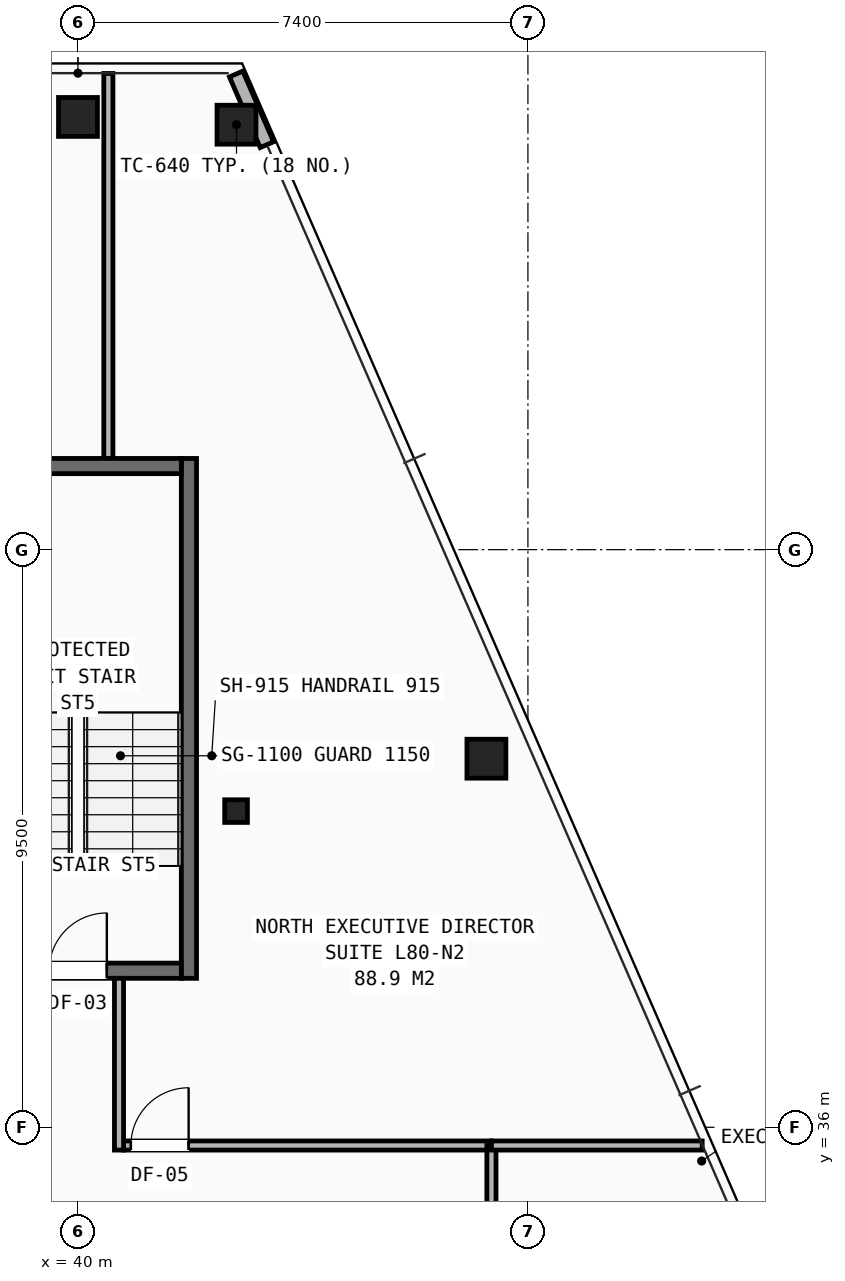
"""IFC4 building model, lengths in metres.
Left out: names, types, materials, properties, quantities, classifications, styles, units other than length and angle.
Written with IfcOpenShell. Run it as: python <this file> out.ifc"""

import sys

from ifc_helpers import new_model, si_unit, direction, frame, frame_2d, origin, origin_2d, place, context, subcontext, project, spatial, rectangle, hollow_rectangle, i_section, extrude, element, fill, save


model = new_model("IFC4")
c1 = context("Model", 3, precision=1e-05, world=origin(), true_north=direction((0.0, 1.0)))
c2 = subcontext(c1, "Body", "Model", "MODEL_VIEW")
j1 = project(units=[si_unit("LENGTHUNIT", "METRE"), si_unit("PLANEANGLEUNIT", "RADIAN")], contexts=[c1])
p1 = place(None, origin())
s1 = spatial("IfcSite", under=j1, at=p1, CompositionType="ELEMENT")
p2 = place(p1, origin())
s2 = spatial("IfcBuilding", under=s1, at=p2, CompositionType="ELEMENT")
p3 = place(p2, frame((0.0, 0.0, 283.0)))
s3 = spatial("IfcBuildingStorey", under=s2, at=p3, CompositionType="ELEMENT", Elevation=283.0)
p4 = place(p3, frame((42.6, 41.2, 0.0), z_axis=(0.0, 0.0, 1.0), x_axis=(1.0, 0.0, 0.0)))
e1 = element("IfcColumn", 1, at=p4, inside=s3, PredefinedType="COLUMN", context=c2, shape_type="SweptSolid", body=[
    extrude(i_section(OverallWidth=0.374, OverallDepth=0.372, WebThickness=0.016, FlangeThickness=0.026, at=origin_2d()), origin(), (0.0, 0.0, 1.0), 3.5),
])
for number, where, z_axis, x_axis in (
    (2, (42.607, 52.489, 0.0), (0.0, 0.0, 1.0), (1.0, 0.0, 0.0)),
    (3, (40.0, 52.617, 0.0), (0.0, 0.0, 1.0), (1.0, 0.0, 0.0)),
    (4, (46.717, 42.062, 0.0), (0.0, 0.0, 1.0), (1.0, 0.0, 0.0)),
):
    element("IfcColumn", number, at=place(p3, frame(where, z_axis=z_axis, x_axis=x_axis)), inside=s3, PredefinedType="COLUMN", context=c2, shape_type="SweptSolid", body=[
        extrude(hollow_rectangle(XDim=0.64, YDim=0.64, WallThickness=0.045, at=origin_2d()), origin(), (0.0, 0.0, 1.0), 3.5),
    ])
p5 = place(p3, frame((43.107, 52.161, 0.0), z_axis=(0.0, 0.0, 1.0), x_axis=(-0.398888090641, 0.916999613492, 0.0)))
e5 = element("IfcWall", 5, at=p5, inside=s3, PredefinedType="SHEAR", context=c2, shape_type="SweptSolid", body=[
    extrude(rectangle(XDim=1.268, YDim=0.24, at=frame_2d((0.634, 0.0))), origin(), (0.0, 0.0, 1.0), 2.623),
])
p6 = place(p3, frame((40.75, 35.7, 0.0), z_axis=(0.0, 0.0, 1.0), x_axis=(1.0, 0.0, 0.0)))
e6 = element("IfcWall", 6, at=p6, inside=s3, PredefinedType="PARTITIONING", context=c2, shape_type="SweptSolid", body=[
    extrude(rectangle(XDim=6.05, YDim=0.15, at=frame_2d((3.025, 0.0))), origin(), (0.0, 0.0, 1.0), 3.25),
])
p7 = place(p6, frame((0.12, 0.0, 0.0)))
e7 = element("IfcOpeningElement", 7, at=p7, cuts=e6, PredefinedType="OPENING", context=c2, shape_type="SweptSolid", body=[
    extrude(rectangle(XDim=0.95, YDim=2.1, at=frame_2d((0.475, 1.05))), frame((0.0, 0.085, 0.0), z_axis=(0.0, -1.0, 0.0), x_axis=(1.0, 0.0, 0.0)), (0.0, 0.0, 1.0), 0.17),
])
p8 = place(p3, frame((46.8, 31.2, 0.0), z_axis=(0.0, 0.0, 1.0), x_axis=(0.0, 1.0, 0.0)))
e8 = element("IfcWall", 8, at=p8, inside=s3, PredefinedType="PARTITIONING", context=c2, shape_type="SweptSolid", body=[
    extrude(rectangle(XDim=4.5, YDim=0.15, at=frame_2d((2.25, 0.0))), origin(), (0.0, 0.0, 1.0), 2.978),
])
p9 = place(p3, frame((46.8, 35.7, 0.0), z_axis=(0.0, 0.0, 1.0), x_axis=(1.0, 0.0, 0.0)))
e9 = element("IfcWall", 9, at=p9, inside=s3, PredefinedType="PARTITIONING", context=c2, shape_type="SweptSolid", body=[
    extrude(rectangle(XDim=3.466, YDim=0.15, at=frame_2d((1.733, 0.0))), origin(), (0.0, 0.0, 1.0), 2.628),
])
p10 = place(p3, frame((40.5, 47.0, 0.0), z_axis=(0.0, 0.0, 1.0), x_axis=(0.0, 1.0, 0.0)))
e10 = element("IfcWall", 10, at=p10, inside=s3, PredefinedType="PARTITIONING", context=c2, shape_type="SweptSolid", body=[
    extrude(rectangle(XDim=6.332, YDim=0.15, at=frame_2d((3.166, 0.0))), origin(), (0.0, 0.0, 1.0), 2.628),
])
p11 = place(p3, frame((41.825, 38.45, 0.0), z_axis=(0.0, 0.0, 1.0), x_axis=(0.0, 1.0, 0.0)))
e11 = element("IfcWall", 11, at=p11, inside=s3, PredefinedType="SHEAR", context=c2, shape_type="SweptSolid", body=[
    extrude(rectangle(XDim=8.55, YDim=0.25, at=frame_2d((4.275, 0.0))), origin(), (0.0, 0.0, 1.0), 3.25),
])
p12 = place(p3, frame((38.3, 38.575, 0.0), z_axis=(0.0, 0.0, 1.0), x_axis=(1.0, 0.0, 0.0)))
e12 = element("IfcWall", 12, at=p12, inside=s3, PredefinedType="SHEAR", context=c2, shape_type="SweptSolid", body=[
    extrude(rectangle(XDim=3.4, YDim=0.25, at=frame_2d((1.7, 0.0))), origin(), (0.0, 0.0, 1.0), 3.25),
])
p13 = place(p12, frame((1.225, 0.0, 0.0)))
e13 = element("IfcOpeningElement", 13, at=p13, cuts=e12, PredefinedType="OPENING", context=c2, shape_type="SweptSolid", body=[
    extrude(rectangle(XDim=0.95, YDim=2.1, at=frame_2d((0.475, 1.05))), frame((0.0, 0.135, 0.0), z_axis=(0.0, -1.0, 0.0), x_axis=(1.0, 0.0, 0.0)), (0.0, 0.0, 1.0), 0.27),
])
p14 = place(p3, frame((38.3, 46.875, 0.0), z_axis=(0.0, 0.0, 1.0), x_axis=(1.0, 0.0, 0.0)))
e14 = element("IfcWall", 14, at=p14, inside=s3, PredefinedType="SHEAR", context=c2, shape_type="SweptSolid", body=[
    extrude(rectangle(XDim=3.4, YDim=0.25, at=frame_2d((1.7, 0.0))), origin(), (0.0, 0.0, 1.0), 3.25),
])
p15 = place(p3, frame((40.675, 35.625, 0.0), z_axis=(0.0, 0.0, 1.0), x_axis=(0.0, 1.0, 0.0)))
e15 = element("IfcWall", 15, at=p15, inside=s3, PredefinedType="PARTITIONING", context=c2, shape_type="SweptSolid", body=[
    extrude(rectangle(XDim=2.825, YDim=0.15, at=frame_2d((1.413, 0.0))), origin(), (0.0, 0.0, 1.0), 3.25),
])
p16 = place(p7, origin())
e16 = element("IfcDoor", 16, at=p16, inside=s3, OperationType="SINGLE_SWING_RIGHT", PredefinedType="DOOR", context=c2, shape_type="SweptSolid", body=[
    extrude(rectangle(XDim=0.95, YDim=2.1, at=frame_2d((0.475, 1.05))), frame((0.0, 0.025, 0.0), z_axis=(0.0, -1.0, 0.0), x_axis=(1.0, 0.0, 0.0)), (0.0, 0.0, 1.0), 0.05),
])
fill(e7, e16)
p17 = place(p13, origin())
e17 = element("IfcDoor", 17, at=p17, inside=s3, OperationType="SINGLE_SWING_RIGHT", PredefinedType="DOOR", context=c2, shape_type="SweptSolid", body=[
    extrude(rectangle(XDim=0.95, YDim=2.1, at=frame_2d((0.475, 1.05))), frame((0.0, 0.025, 0.0), z_axis=(0.0, -1.0, 0.0), x_axis=(1.0, 0.0, 0.0)), (0.0, 0.0, 1.0), 0.05),
])
fill(e13, e17)
save(model, sys.argv[1])
